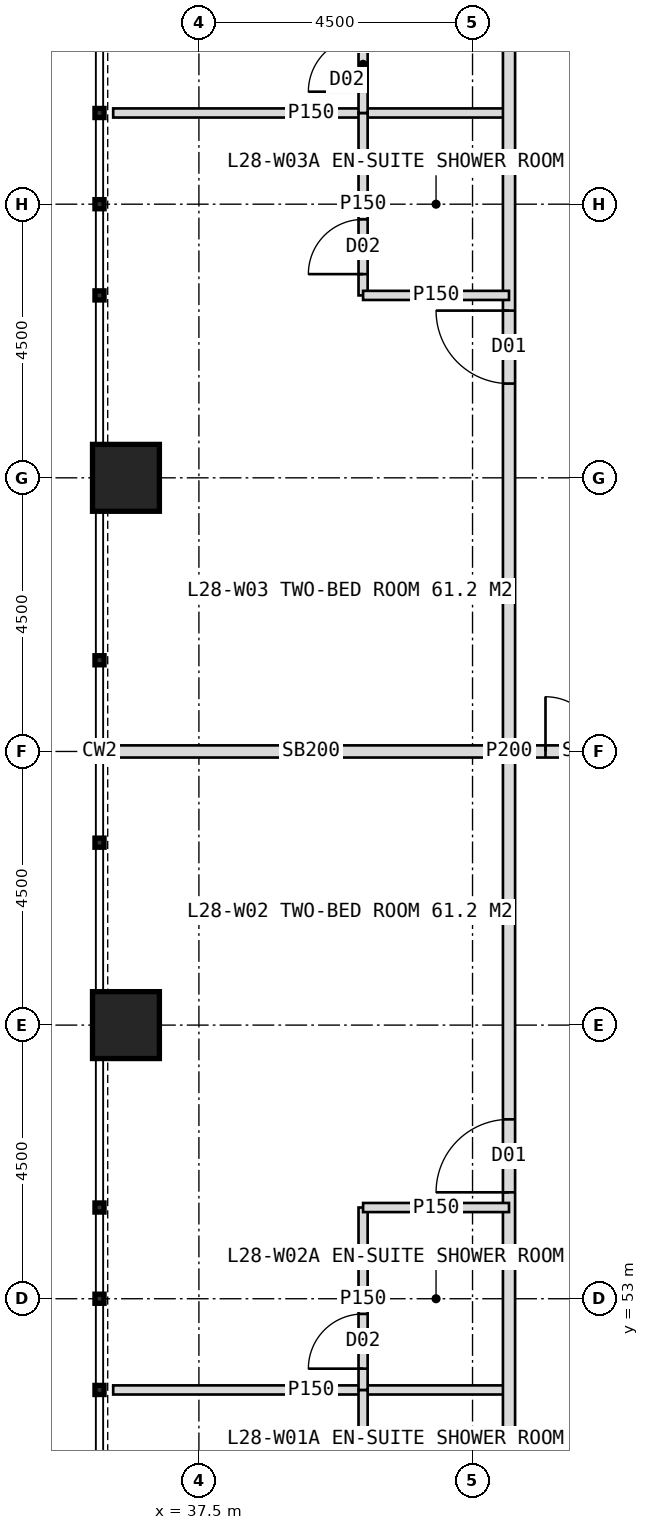
"""IFC4 building model, lengths in metres.
Left out: names, types, materials, properties, quantities, classifications, styles, units other than length and angle.
Written with IfcOpenShell. Run it as: python <this file> out.ifc"""

import sys

from ifc_helpers import new_model, si_unit, direction, frame, frame_2d, origin, origin_2d, place, context, subcontext, project, spatial, rectangle, hollow_rectangle, extrude, element, fill, save


model = new_model("IFC4")
c1 = context("Model", 3, precision=1e-05, world=origin(), true_north=direction((0.0, 1.0)))
c2 = subcontext(c1, "Body", "Model", "MODEL_VIEW")
j1 = project(units=[si_unit("LENGTHUNIT", "METRE"), si_unit("PLANEANGLEUNIT", "RADIAN")], contexts=[c1])
p1 = place(None, origin())
s1 = spatial("IfcSite", under=j1, at=p1, CompositionType="ELEMENT")
p2 = place(p1, origin())
s2 = spatial("IfcBuilding", under=s1, at=p2, CompositionType="ELEMENT")
p3 = place(p2, frame((0.0, 0.0, 120.0)))
s3 = spatial("IfcBuildingStorey", under=s2, at=p3, CompositionType="ELEMENT", Elevation=120.0)
for number, where, z_axis, x_axis in (
    (1, (36.3, 57.5, 0.0), (0.0, 0.0, 1.0), (1.0, 0.0, 0.0)),
    (2, (36.3, 66.5, 0.0), (0.0, 0.0, 1.0), (1.0, 0.0, 0.0)),
):
    element("IfcColumn", number, at=place(p3, frame(where, z_axis=z_axis, x_axis=x_axis)), inside=s3, PredefinedType="COLUMN", context=c2, shape_type="SweptSolid", body=[
        extrude(hollow_rectangle(XDim=1.1, YDim=1.1, WallThickness=0.1, at=origin_2d()), origin(), (0.0, 0.0, 1.0), 4.0),
    ])
p4 = place(p3, frame((42.6, 51.5, 0.0), z_axis=(0.0, 0.0, 1.0), x_axis=(-1.0, 0.0, 0.0)))
e3 = element("IfcWall", 3, at=p4, inside=s3, PredefinedType="PARTITIONING", context=c2, shape_type="SweptSolid", body=[
    extrude(rectangle(XDim=6.51, YDim=0.15, at=frame_2d((3.255, 0.0))), origin(), (0.0, 0.0, 1.0), 3.75),
])
p5 = place(p3, frame((42.6, 62.0, 0.0), z_axis=(0.0, 0.0, 1.0), x_axis=(-1.0, 0.0, 0.0)))
e4 = element("IfcWall", 4, at=p5, inside=s3, PredefinedType="SOLIDWALL", context=c2, shape_type="SweptSolid", body=[
    extrude(rectangle(XDim=6.51, YDim=0.2, at=frame_2d((3.255, 0.0))), origin(), (0.0, 0.0, 1.0), 2.95),
])
p6 = place(p3, frame((42.6, 72.5, 0.0), z_axis=(0.0, 0.0, 1.0), x_axis=(-1.0, 0.0, 0.0)))
e5 = element("IfcWall", 5, at=p6, inside=s3, PredefinedType="PARTITIONING", context=c2, shape_type="SweptSolid", body=[
    extrude(rectangle(XDim=6.51, YDim=0.15, at=frame_2d((3.255, 0.0))), origin(), (0.0, 0.0, 1.0), 3.75),
])
p7 = place(p3, frame((42.6, 44.6, 0.0), z_axis=(0.0, 0.0, 1.0), x_axis=(0.0, 1.0, 0.0)))
e6 = element("IfcWall", 6, at=p7, inside=s3, PredefinedType="PARTITIONING", context=c2, shape_type="SweptSolid", body=[
    extrude(rectangle(XDim=34.8, YDim=0.2, at=frame_2d((17.4, 0.0))), origin(), (0.0, 0.0, 1.0), 3.75),
])
p8 = place(p7, frame((2.45, 0.0, 0.0)))
e7 = element("IfcOpeningElement", 7, at=p8, cuts=e6, PredefinedType="OPENING", context=c2, shape_type="SweptSolid", body=[
    extrude(rectangle(XDim=1.2, YDim=2.2, at=frame_2d((0.6, 1.1))), frame((0.0, 0.11, 0.0), z_axis=(0.0, -1.0, 0.0), x_axis=(1.0, 0.0, 0.0)), (0.0, 0.0, 1.0), 0.22),
])
p9 = place(p7, frame((10.15, 0.0, 0.0)))
e8 = element("IfcOpeningElement", 8, at=p9, cuts=e6, PredefinedType="OPENING", context=c2, shape_type="SweptSolid", body=[
    extrude(rectangle(XDim=1.2, YDim=2.2, at=frame_2d((0.6, 1.1))), frame((0.0, 0.11, 0.0), z_axis=(0.0, -1.0, 0.0), x_axis=(1.0, 0.0, 0.0)), (0.0, 0.0, 1.0), 0.22),
])
p10 = place(p7, frame((23.45, 0.0, 0.0)))
e9 = element("IfcOpeningElement", 9, at=p10, cuts=e6, PredefinedType="OPENING", context=c2, shape_type="SweptSolid", body=[
    extrude(rectangle(XDim=1.2, YDim=2.2, at=frame_2d((0.6, 1.1))), frame((0.0, 0.11, 0.0), z_axis=(0.0, -1.0, 0.0), x_axis=(1.0, 0.0, 0.0)), (0.0, 0.0, 1.0), 0.22),
])
p11 = place(p7, frame((30.55, 0.0, 0.0)))
e10 = element("IfcOpeningElement", 10, at=p11, cuts=e6, PredefinedType="OPENING", context=c2, shape_type="SweptSolid", body=[
    extrude(rectangle(XDim=1.2, YDim=2.2, at=frame_2d((0.6, 1.1))), frame((0.0, 0.11, 0.0), z_axis=(0.0, -1.0, 0.0), x_axis=(1.0, 0.0, 0.0)), (0.0, 0.0, 1.0), 0.22),
])
p12 = place(p3, frame((40.2, 48.5, 0.0), z_axis=(0.0, 0.0, 1.0), x_axis=(0.0, 1.0, 0.0)))
e11 = element("IfcWall", 11, at=p12, inside=s3, PredefinedType="PARTITIONING", context=c2, shape_type="SweptSolid", body=[
    extrude(rectangle(XDim=3.0, YDim=0.15, at=frame_2d((1.5, 0.0))), origin(), (0.0, 0.0, 1.0), 3.75),
])
p13 = place(p12, frame((0.35, 0.0, 0.0)))
e12 = element("IfcOpeningElement", 12, at=p13, cuts=e11, PredefinedType="OPENING", context=c2, shape_type="SweptSolid", body=[
    extrude(rectangle(XDim=0.9, YDim=2.1, at=frame_2d((0.45, 1.05))), frame((0.0, 0.085, 0.0), z_axis=(0.0, -1.0, 0.0), x_axis=(1.0, 0.0, 0.0)), (0.0, 0.0, 1.0), 0.17),
])
p14 = place(p3, frame((40.2, 51.5, 0.0), z_axis=(0.0, 0.0, 1.0), x_axis=(0.0, 1.0, 0.0)))
e13 = element("IfcWall", 13, at=p14, inside=s3, PredefinedType="PARTITIONING", context=c2, shape_type="SweptSolid", body=[
    extrude(rectangle(XDim=3.0, YDim=0.15, at=frame_2d((1.5, 0.0))), origin(), (0.0, 0.0, 1.0), 3.75),
])
p15 = place(p14, frame((0.35, 0.0, 0.0)))
e14 = element("IfcOpeningElement", 14, at=p15, cuts=e13, PredefinedType="OPENING", context=c2, shape_type="SweptSolid", body=[
    extrude(rectangle(XDim=0.9, YDim=2.1, at=frame_2d((0.45, 1.05))), frame((0.0, 0.085, 0.0), z_axis=(0.0, -1.0, 0.0), x_axis=(1.0, 0.0, 0.0)), (0.0, 0.0, 1.0), 0.17),
])
p16 = place(p3, frame((42.6, 54.5, 0.0), z_axis=(0.0, 0.0, 1.0), x_axis=(-1.0, 0.0, 0.0)))
e15 = element("IfcWall", 15, at=p16, inside=s3, PredefinedType="PARTITIONING", context=c2, shape_type="SweptSolid", body=[
    extrude(rectangle(XDim=2.4, YDim=0.15, at=frame_2d((1.2, 0.0))), origin(), (0.0, 0.0, 1.0), 3.75),
])
p17 = place(p3, frame((40.2, 69.5, 0.0), z_axis=(0.0, 0.0, 1.0), x_axis=(0.0, 1.0, 0.0)))
e16 = element("IfcWall", 16, at=p17, inside=s3, PredefinedType="PARTITIONING", context=c2, shape_type="SweptSolid", body=[
    extrude(rectangle(XDim=3.0, YDim=0.15, at=frame_2d((1.5, 0.0))), origin(), (0.0, 0.0, 1.0), 3.75),
])
p18 = place(p17, frame((0.35, 0.0, 0.0)))
e17 = element("IfcOpeningElement", 17, at=p18, cuts=e16, PredefinedType="OPENING", context=c2, shape_type="SweptSolid", body=[
    extrude(rectangle(XDim=0.9, YDim=2.1, at=frame_2d((0.45, 1.05))), frame((0.0, 0.085, 0.0), z_axis=(0.0, -1.0, 0.0), x_axis=(1.0, 0.0, 0.0)), (0.0, 0.0, 1.0), 0.17),
])
p19 = place(p3, frame((42.6, 69.5, 0.0), z_axis=(0.0, 0.0, 1.0), x_axis=(-1.0, 0.0, 0.0)))
e18 = element("IfcWall", 18, at=p19, inside=s3, PredefinedType="PARTITIONING", context=c2, shape_type="SweptSolid", body=[
    extrude(rectangle(XDim=2.4, YDim=0.15, at=frame_2d((1.2, 0.0))), origin(), (0.0, 0.0, 1.0), 3.75),
])
p20 = place(p3, frame((40.2, 72.5, 0.0), z_axis=(0.0, 0.0, 1.0), x_axis=(0.0, 1.0, 0.0)))
e19 = element("IfcWall", 19, at=p20, inside=s3, PredefinedType="PARTITIONING", context=c2, shape_type="SweptSolid", body=[
    extrude(rectangle(XDim=2.4, YDim=0.15, at=frame_2d((1.2, 0.0))), origin(), (0.0, 0.0, 1.0), 3.75),
])
p21 = place(p20, frame((0.35, 0.0, 0.0)))
e20 = element("IfcOpeningElement", 20, at=p21, cuts=e19, PredefinedType="OPENING", context=c2, shape_type="SweptSolid", body=[
    extrude(rectangle(XDim=0.9, YDim=2.1, at=frame_2d((0.45, 1.05))), frame((0.0, 0.085, 0.0), z_axis=(0.0, -1.0, 0.0), x_axis=(1.0, 0.0, 0.0)), (0.0, 0.0, 1.0), 0.17),
])
p22 = place(p3, frame((45.3, 62.0, 0.0), z_axis=(0.0, 0.0, 1.0), x_axis=(-1.0, 0.0, 0.0)))
e21 = element("IfcWall", 21, at=p22, inside=s3, PredefinedType="SOLIDWALL", context=c2, shape_type="SweptSolid", body=[
    extrude(rectangle(XDim=2.7, YDim=0.2, at=frame_2d((1.35, 0.0))), origin(), (0.0, 0.0, 1.0), 2.95),
])
p23 = place(p22, frame((0.3, 0.0, 0.0)))
e22 = element("IfcOpeningElement", 22, at=p23, cuts=e21, PredefinedType="OPENING", context=c2, shape_type="SweptSolid", body=[
    extrude(rectangle(XDim=1.8, YDim=2.2, at=frame_2d((0.9, 1.1))), frame((0.0, 0.11, 0.0), z_axis=(0.0, -1.0, 0.0), x_axis=(1.0, 0.0, 0.0)), (0.0, 0.0, 1.0), 0.22),
])
p24 = place(p9, origin())
e23 = element("IfcDoor", 23, at=p24, inside=s3, OperationType="SINGLE_SWING_LEFT", PredefinedType="DOOR", context=c2, shape_type="SweptSolid", body=[
    extrude(rectangle(XDim=1.2, YDim=2.2, at=frame_2d((0.6, 1.1))), frame((0.0, 0.025, 0.0), z_axis=(0.0, -1.0, 0.0), x_axis=(1.0, 0.0, 0.0)), (0.0, 0.0, 1.0), 0.05),
])
fill(e8, e23)
p25 = place(p15, origin())
e24 = element("IfcDoor", 24, at=p25, inside=s3, OperationType="SINGLE_SWING_LEFT", PredefinedType="DOOR", context=c2, shape_type="SweptSolid", body=[
    extrude(rectangle(XDim=0.9, YDim=2.1, at=frame_2d((0.45, 1.05))), frame((0.0, 0.025, 0.0), z_axis=(0.0, -1.0, 0.0), x_axis=(1.0, 0.0, 0.0)), (0.0, 0.0, 1.0), 0.05),
])
fill(e14, e24)
p26 = place(p10, origin())
e25 = element("IfcDoor", 25, at=p26, inside=s3, OperationType="SINGLE_SWING_RIGHT", PredefinedType="DOOR", context=c2, shape_type="SweptSolid", body=[
    extrude(rectangle(XDim=1.2, YDim=2.2, at=frame_2d((0.6, 1.1))), frame((0.0, 0.025, 0.0), z_axis=(0.0, -1.0, 0.0), x_axis=(1.0, 0.0, 0.0)), (0.0, 0.0, 1.0), 0.05),
])
fill(e9, e25)
p27 = place(p18, origin())
e26 = element("IfcDoor", 26, at=p27, inside=s3, OperationType="SINGLE_SWING_LEFT", PredefinedType="DOOR", context=c2, shape_type="SweptSolid", body=[
    extrude(rectangle(XDim=0.9, YDim=2.1, at=frame_2d((0.45, 1.05))), frame((0.0, 0.025, 0.0), z_axis=(0.0, -1.0, 0.0), x_axis=(1.0, 0.0, 0.0)), (0.0, 0.0, 1.0), 0.05),
])
fill(e17, e26)
p28 = place(p21, origin())
e27 = element("IfcDoor", 27, at=p28, inside=s3, OperationType="SINGLE_SWING_LEFT", PredefinedType="DOOR", context=c2, shape_type="SweptSolid", body=[
    extrude(rectangle(XDim=0.9, YDim=2.1, at=frame_2d((0.45, 1.05))), frame((0.0, 0.025, 0.0), z_axis=(0.0, -1.0, 0.0), x_axis=(1.0, 0.0, 0.0)), (0.0, 0.0, 1.0), 0.05),
])
fill(e20, e27)
p29 = place(p23, origin())
e28 = element("IfcDoor", 28, at=p29, inside=s3, OperationType="DOUBLE_DOOR_DOUBLE_SWING", PredefinedType="DOOR", context=c2, shape_type="SweptSolid", body=[
    extrude(rectangle(XDim=1.8, YDim=2.2, at=frame_2d((0.9, 1.1))), frame((0.0, 0.025, 0.0), z_axis=(0.0, -1.0, 0.0), x_axis=(1.0, 0.0, 0.0)), (0.0, 0.0, 1.0), 0.05),
])
fill(e22, e28)
save(model, sys.argv[1])
